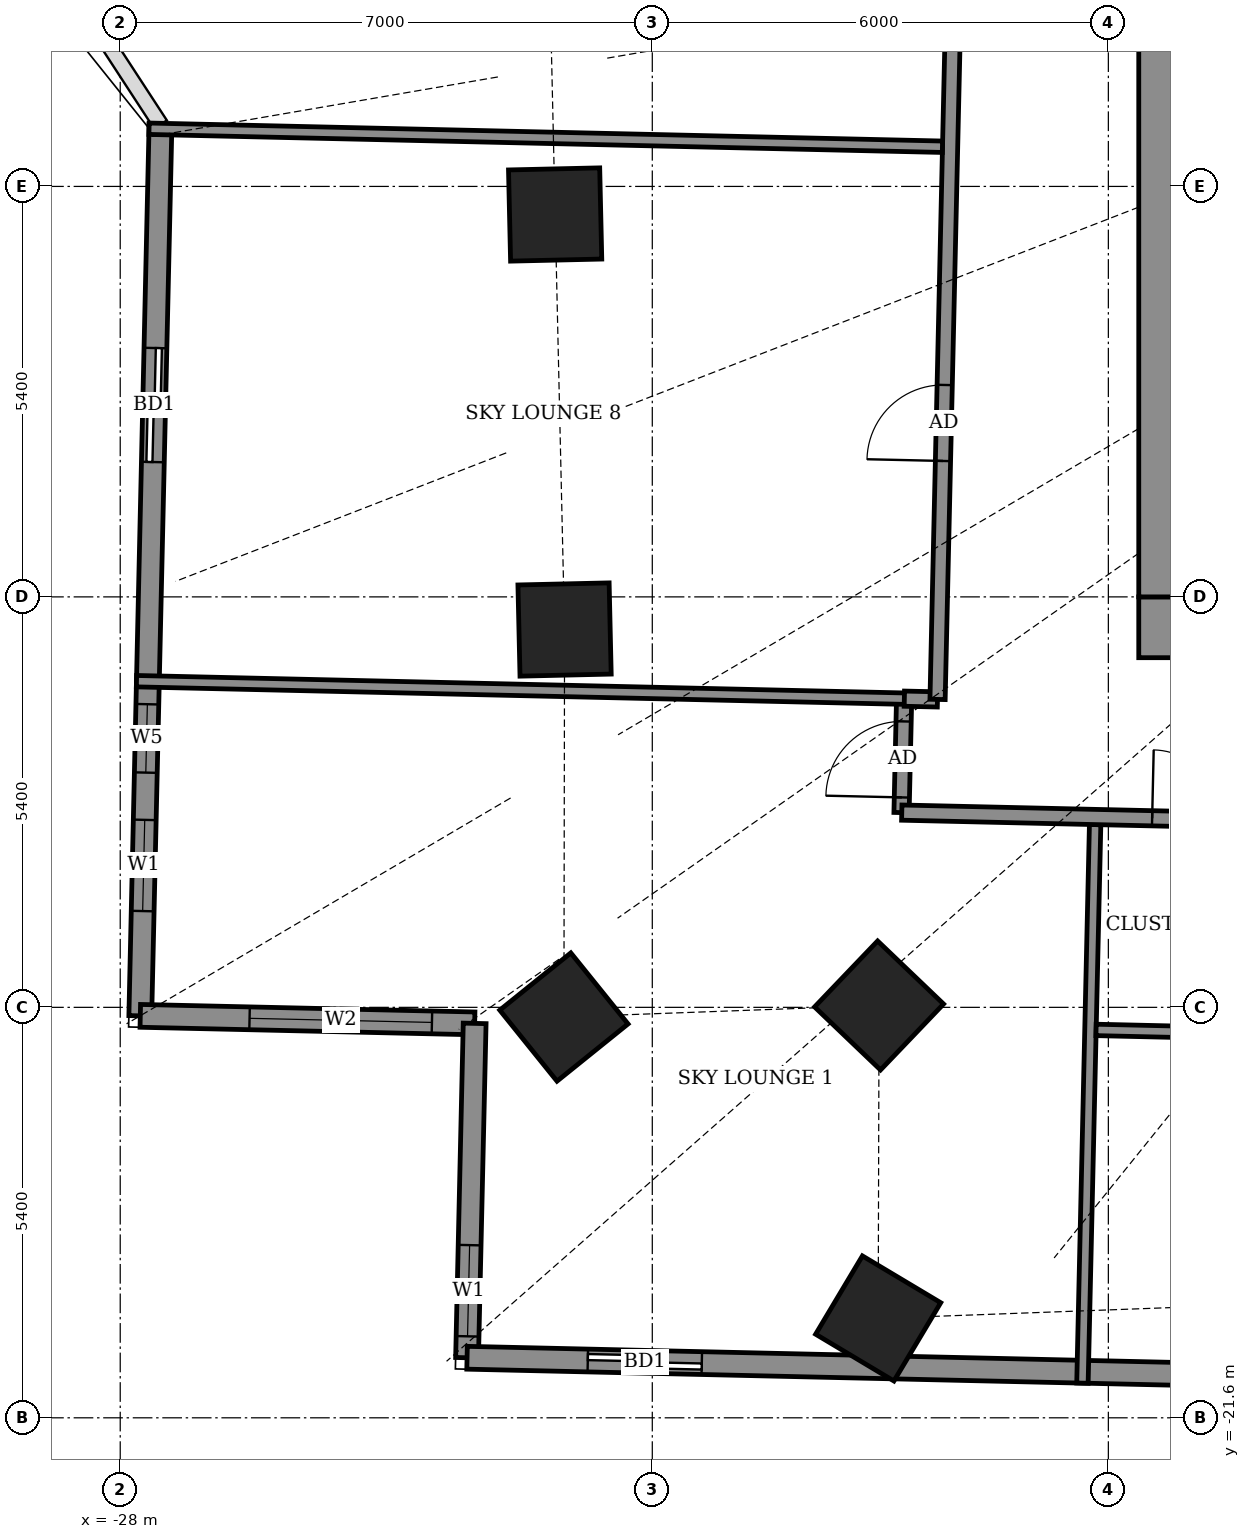
"""IFC4 building model, lengths in metres.
Left out: names, types, materials, properties, quantities, classifications, styles, units other than length and angle.
Written with IfcOpenShell. Run it as: python <this file> out.ifc"""

import sys

from ifc_helpers import new_model, si_unit, direction, frame, frame_2d, origin, origin_2d, place, context, subcontext, project, spatial, rectangle, extrude, element, fill, save


model = new_model("IFC4")
c1 = context("Model", 3, precision=1e-05, world=origin(), true_north=direction((0.0, 1.0)))
c2 = subcontext(c1, "Body", "Model", "MODEL_VIEW")
j1 = project(units=[si_unit("LENGTHUNIT", "METRE"), si_unit("PLANEANGLEUNIT", "RADIAN")], contexts=[c1])
p1 = place(None, origin())
s1 = spatial("IfcSite", under=j1, at=p1, CompositionType="ELEMENT")
p2 = place(p1, origin())
s2 = spatial("IfcBuilding", under=s1, at=p2, CompositionType="ELEMENT")
p3 = place(p2, frame((0.0, 0.0, 193.3)))
s3 = spatial("IfcBuildingStorey", under=s2, at=p3, CompositionType="ELEMENT", Elevation=193.3)
for number, where, z_axis, x_axis in (
    (1, (-22.278, -5.769, -0.55), (0.0, 0.0, 1.0), (0.023, -1.0, 0.0)),
    (2, (-22.154, -11.229, -0.55), (0.0, 0.0, 1.0), (0.023, -1.0, 0.0)),
    (3, (-22.163, -16.328, -0.55), (0.0, 0.0, 1.0), (0.627, -0.779, 0.0)),
    (4, (-18.016, -16.175, -0.55), (0.0, 0.0, 1.0), (0.723, -0.691, 0.0)),
    (5, (-18.028, -20.293, -0.55), (0.0, 0.0, 1.0), (0.858, -0.513, 0.0)),
):
    element("IfcColumn", number, at=place(p3, frame(where, z_axis=z_axis, x_axis=x_axis)), inside=s3, PredefinedType="COLUMN", context=c2, shape_type="SweptSolid", body=[
        extrude(rectangle(XDim=1.2, YDim=1.2, at=origin_2d()), origin(), (0.0, 0.0, 1.0), 4.6),
    ])
p4 = place(p3, frame((-27.47, -4.585, 0.0), z_axis=(0.0, 0.0, 1.0), x_axis=(-0.022686419344, -0.999742630069, 0.0)))
e6 = element("IfcWall", 6, at=p4, inside=s3, PredefinedType="SOLIDWALL", context=c2, shape_type="SweptSolid", body=[
    extrude(rectangle(XDim=11.73, YDim=0.3, at=frame_2d((5.865, 0.0))), origin(), (0.0, 0.0, 1.0), 2.85),
])
p5 = place(p4, frame((2.942, 0.0, 0.0)))
e7 = element("IfcOpeningElement", 7, at=p5, cuts=e6, PredefinedType="OPENING", context=c2, shape_type="SweptSolid", body=[
    extrude(rectangle(XDim=1.5, YDim=2.4, at=frame_2d((0.75, 1.2))), frame((0.0, 0.16, 0.0), z_axis=(0.0, -1.0, 0.0), x_axis=(1.0, 0.0, 0.0)), (0.0, 0.0, 1.0), 0.32),
])
p6 = place(p4, frame((7.629, 0.0, 0.9)))
e8 = element("IfcOpeningElement", 8, at=p6, cuts=e6, PredefinedType="OPENING", context=c2, shape_type="SweptSolid", body=[
    extrude(rectangle(XDim=0.9, YDim=1.5, at=frame_2d((0.45, 0.75))), frame((0.0, 0.16, 0.0), z_axis=(0.0, -1.0, 0.0), x_axis=(1.0, 0.0, 0.0)), (0.0, 0.0, 1.0), 0.32),
])
p7 = place(p4, frame((9.151, 0.0, 0.9)))
e9 = element("IfcOpeningElement", 9, at=p7, cuts=e6, PredefinedType="OPENING", context=c2, shape_type="SweptSolid", body=[
    extrude(rectangle(XDim=1.2, YDim=1.5, at=frame_2d((0.6, 0.75))), frame((0.0, 0.16, 0.0), z_axis=(0.0, -1.0, 0.0), x_axis=(1.0, 0.0, 0.0)), (0.0, 0.0, 1.0), 0.32),
])
p8 = place(p3, frame((-27.736, -16.312, 0.0), z_axis=(0.0, 0.0, 1.0), x_axis=(0.999747504193, -0.022470599878, 0.0)))
e10 = element("IfcWall", 10, at=p8, inside=s3, PredefinedType="SOLIDWALL", context=c2, shape_type="SweptSolid", body=[
    extrude(rectangle(XDim=4.4, YDim=0.3, at=frame_2d((2.2, 0.0))), origin(), (0.0, 0.0, 1.0), 2.85),
])
p9 = place(p8, frame((1.438, 0.0, 0.9)))
e11 = element("IfcOpeningElement", 11, at=p9, cuts=e10, PredefinedType="OPENING", context=c2, shape_type="SweptSolid", body=[
    extrude(rectangle(XDim=2.4, YDim=1.5, at=frame_2d((1.2, 0.75))), frame((0.0, 0.16, 0.0), z_axis=(0.0, -1.0, 0.0), x_axis=(1.0, 0.0, 0.0)), (0.0, 0.0, 1.0), 0.32),
])
p10 = place(p3, frame((-23.337, -16.411, 0.0), z_axis=(0.0, 0.0, 1.0), x_axis=(-0.022747872013, -0.999741233679, 0.0)))
e12 = element("IfcWall", 12, at=p10, inside=s3, PredefinedType="SOLIDWALL", context=c2, shape_type="SweptSolid", body=[
    extrude(rectangle(XDim=4.4, YDim=0.3, at=frame_2d((2.2, 0.0))), origin(), (0.0, 0.0, 1.0), 2.85),
])
p11 = place(p10, frame((2.918, 0.0, 0.9)))
e13 = element("IfcOpeningElement", 13, at=p11, cuts=e12, PredefinedType="OPENING", context=c2, shape_type="SweptSolid", body=[
    extrude(rectangle(XDim=1.2, YDim=1.5, at=frame_2d((0.6, 0.75))), frame((0.0, 0.16, 0.0), z_axis=(0.0, -1.0, 0.0), x_axis=(1.0, 0.0, 0.0)), (0.0, 0.0, 1.0), 0.32),
])
p12 = place(p3, frame((-23.437, -20.81, 0.0), z_axis=(0.0, 0.0, 1.0), x_axis=(0.999742269115, -0.022702320244, 0.0)))
e14 = element("IfcWall", 14, at=p12, inside=s3, PredefinedType="SOLIDWALL", context=c2, shape_type="SweptSolid", body=[
    extrude(rectangle(XDim=41.844, YDim=0.3, at=frame_2d((20.922, 0.0))), origin(), (0.0, 0.0, 1.0), 2.65),
])
p13 = place(p12, frame((1.589, 0.0, 0.0)))
e15 = element("IfcOpeningElement", 15, at=p13, cuts=e14, PredefinedType="OPENING", context=c2, shape_type="SweptSolid", body=[
    extrude(rectangle(XDim=1.5, YDim=2.4, at=frame_2d((0.75, 1.2))), frame((0.0, 0.16, 0.0), z_axis=(0.0, -1.0, 0.0), x_axis=(1.0, 0.0, 0.0)), (0.0, 0.0, 1.0), 0.32),
])
p14 = place(p12, frame((13.061, 0.0, 0.9)))
e16 = element("IfcOpeningElement", 16, at=p14, cuts=e14, PredefinedType="OPENING", context=c2, shape_type="SweptSolid", body=[
    extrude(rectangle(XDim=2.4, YDim=1.5, at=frame_2d((1.2, 0.75))), frame((0.0, 0.16, 0.0), z_axis=(0.0, -1.0, 0.0), x_axis=(1.0, 0.0, 0.0)), (0.0, 0.0, 1.0), 0.32),
])
p15 = place(p12, frame((19.323, 0.0, 0.0)))
e17 = element("IfcOpeningElement", 17, at=p15, cuts=e14, PredefinedType="OPENING", context=c2, shape_type="SweptSolid", body=[
    extrude(rectangle(XDim=1.5, YDim=2.4, at=frame_2d((0.75, 1.2))), frame((0.0, 0.16, 0.0), z_axis=(0.0, -1.0, 0.0), x_axis=(1.0, 0.0, 0.0)), (0.0, 0.0, 1.0), 0.32),
])
p16 = place(p12, frame((22.283, 0.0, 0.0)))
e18 = element("IfcOpeningElement", 18, at=p16, cuts=e14, PredefinedType="OPENING", context=c2, shape_type="SweptSolid", body=[
    extrude(rectangle(XDim=1.5, YDim=2.4, at=frame_2d((0.75, 1.2))), frame((0.0, 0.16, 0.0), z_axis=(0.0, -1.0, 0.0), x_axis=(1.0, 0.0, 0.0)), (0.0, 0.0, 1.0), 0.32),
])
p17 = place(p12, frame((28.825, 0.0, 0.9)))
e19 = element("IfcOpeningElement", 19, at=p17, cuts=e14, PredefinedType="OPENING", context=c2, shape_type="SweptSolid", body=[
    extrude(rectangle(XDim=2.4, YDim=1.5, at=frame_2d((1.2, 0.75))), frame((0.0, 0.16, 0.0), z_axis=(0.0, -1.0, 0.0), x_axis=(1.0, 0.0, 0.0)), (0.0, 0.0, 1.0), 0.32),
])
p18 = place(p12, frame((36.672, 0.0, 0.9)))
e20 = element("IfcOpeningElement", 20, at=p18, cuts=e14, PredefinedType="OPENING", context=c2, shape_type="SweptSolid", body=[
    extrude(rectangle(XDim=2.4, YDim=1.5, at=frame_2d((1.2, 0.75))), frame((0.0, 0.16, 0.0), z_axis=(0.0, -1.0, 0.0), x_axis=(1.0, 0.0, 0.0)), (0.0, 0.0, 1.0), 0.32),
])
p19 = place(p3, frame((-15.341, -21.144, 0.0), z_axis=(0.0, 0.0, 1.0), x_axis=(0.022719896304, 0.99974186984, 0.0)))
e21 = element("IfcWall", 21, at=p19, inside=s3, PredefinedType="PARTITIONING", context=c2, shape_type="SweptSolid", body=[
    extrude(rectangle(XDim=7.35, YDim=0.15, at=frame_2d((3.675, 0.0))), origin(), (0.0, 0.0, 1.0), 2.65),
])
p20 = place(p3, frame((-15.162, -16.497, 0.0), z_axis=(0.0, 0.0, 1.0), x_axis=(0.99974031529, -0.022788198363, 0.0)))
e22 = element("IfcWall", 22, at=p20, inside=s3, PredefinedType="PARTITIONING", context=c2, shape_type="SweptSolid", body=[
    extrude(rectangle(XDim=2.325, YDim=0.15, at=frame_2d((1.162, 0.0))), origin(), (0.0, 0.0, 1.0), 2.85),
])
p21 = place(p3, frame((-17.721, -13.638, 0.0), z_axis=(0.0, 0.0, 1.0), x_axis=(0.022632637625, 0.99974384905, 0.0)))
e23 = element("IfcWall", 23, at=p21, inside=s3, PredefinedType="PARTITIONING", context=c2, shape_type="SweptSolid", body=[
    extrude(rectangle(XDim=1.5, YDim=0.2, at=frame_2d((0.75, 0.0))), origin(), (0.0, 0.0, 1.0), 2.85),
])
p22 = place(p21, frame((0.2, 0.0, 0.0)))
e24 = element("IfcOpeningElement", 24, at=p22, cuts=e23, PredefinedType="OPENING", context=c2, shape_type="SweptSolid", body=[
    extrude(rectangle(XDim=1.0, YDim=2.1, at=frame_2d((0.5, 1.05))), frame((0.0, 0.11, 0.0), z_axis=(0.0, -1.0, 0.0), x_axis=(1.0, 0.0, 0.0)), (0.0, 0.0, 1.0), 0.22),
])
p23 = place(p3, frame((-17.718, -13.638, 0.0), z_axis=(0.0, 0.0, 1.0), x_axis=(0.999742614446, -0.022687107814, 0.0)))
e25 = element("IfcWall", 25, at=p23, inside=s3, PredefinedType="PARTITIONING", context=c2, shape_type="SweptSolid", body=[
    extrude(rectangle(XDim=37.514, YDim=0.2, at=frame_2d((18.757, 0.0))), origin(), (0.0, 0.0, 1.0), 2.85),
])
p24 = place(p23, frame((7.37, 0.0, 0.0)))
e26 = element("IfcOpeningElement", 26, at=p24, cuts=e25, PredefinedType="OPENING", context=c2, shape_type="SweptSolid", body=[
    extrude(rectangle(XDim=1.0, YDim=2.1, at=frame_2d((0.5, 1.05))), frame((0.0, 0.11, 0.0), z_axis=(0.0, -1.0, 0.0), x_axis=(1.0, 0.0, 0.0)), (0.0, 0.0, 1.0), 0.22),
])
p25 = place(p23, frame((3.295, 0.0, 0.0)))
e27 = element("IfcOpeningElement", 27, at=p25, cuts=e25, PredefinedType="OPENING", context=c2, shape_type="SweptSolid", body=[
    extrude(rectangle(XDim=0.9, YDim=2.1, at=frame_2d((0.45, 1.05))), frame((0.0, 0.11, 0.0), z_axis=(0.0, -1.0, 0.0), x_axis=(1.0, 0.0, 0.0)), (0.0, 0.0, 1.0), 0.22),
])
p26 = place(p23, frame((11.645, 0.0, 0.0)))
e28 = element("IfcOpeningElement", 28, at=p26, cuts=e25, PredefinedType="OPENING", context=c2, shape_type="SweptSolid", body=[
    extrude(rectangle(XDim=0.9, YDim=2.1, at=frame_2d((0.45, 1.05))), frame((0.0, 0.11, 0.0), z_axis=(0.0, -1.0, 0.0), x_axis=(1.0, 0.0, 0.0)), (0.0, 0.0, 1.0), 0.22),
])
p27 = place(p23, frame((19.02, 0.0, 0.0)))
e29 = element("IfcOpeningElement", 29, at=p27, cuts=e25, PredefinedType="OPENING", context=c2, shape_type="SweptSolid", body=[
    extrude(rectangle(XDim=0.9, YDim=2.1, at=frame_2d((0.45, 1.05))), frame((0.0, 0.11, 0.0), z_axis=(0.0, -1.0, 0.0), x_axis=(1.0, 0.0, 0.0)), (0.0, 0.0, 1.0), 0.22),
])
p28 = place(p23, frame((22.67, 0.0, 0.0)))
e30 = element("IfcOpeningElement", 30, at=p28, cuts=e25, PredefinedType="OPENING", context=c2, shape_type="SweptSolid", body=[
    extrude(rectangle(XDim=1.0, YDim=2.1, at=frame_2d((0.5, 1.05))), frame((0.0, 0.11, 0.0), z_axis=(0.0, -1.0, 0.0), x_axis=(1.0, 0.0, 0.0)), (0.0, 0.0, 1.0), 0.22),
])
p29 = place(p23, frame((26.445, 0.0, 0.0)))
e31 = element("IfcOpeningElement", 31, at=p29, cuts=e25, PredefinedType="OPENING", context=c2, shape_type="SweptSolid", body=[
    extrude(rectangle(XDim=0.9, YDim=2.1, at=frame_2d((0.45, 1.05))), frame((0.0, 0.11, 0.0), z_axis=(0.0, -1.0, 0.0), x_axis=(1.0, 0.0, 0.0)), (0.0, 0.0, 1.0), 0.22),
])
p30 = place(p23, frame((33.375, 0.0, 0.0)))
e32 = element("IfcOpeningElement", 32, at=p30, cuts=e25, PredefinedType="OPENING", context=c2, shape_type="SweptSolid", body=[
    extrude(rectangle(XDim=1.0, YDim=2.1, at=frame_2d((0.5, 1.05))), frame((0.0, 0.11, 0.0), z_axis=(0.0, -1.0, 0.0), x_axis=(1.0, 0.0, 0.0)), (0.0, 0.0, 1.0), 0.22),
])
p31 = place(p3, frame((-27.786, -11.909, 0.0), z_axis=(0.0, 0.0, 1.0), x_axis=(0.999741161797, -0.022751030932, 0.0)))
e33 = element("IfcWall", 33, at=p31, inside=s3, PredefinedType="PARTITIONING", context=c2, shape_type="SweptSolid", body=[
    extrude(rectangle(XDim=10.109, YDim=0.15, at=frame_2d((5.054, 0.0))), origin(), (0.0, 0.0, 1.0), 2.65),
])
p32 = place(p3, frame((-17.684, -12.139, 0.0), z_axis=(0.0, 0.0, 1.0), x_axis=(0.999736607625, -0.022950280466, 0.0)))
e34 = element("IfcWall", 34, at=p32, inside=s3, PredefinedType="PARTITIONING", context=c2, shape_type="SweptSolid", body=[
    extrude(rectangle(XDim=0.436, YDim=0.2, at=frame_2d((0.218, 0.0))), origin(), (0.0, 0.0, 1.0), 2.85),
])
p33 = place(p3, frame((-17.247, -12.149, 0.0), z_axis=(0.0, 0.0, 1.0), x_axis=(0.022698146637, 0.999742363881, 0.0)))
e35 = element("IfcWall", 35, at=p33, inside=s3, PredefinedType="PARTITIONING", context=c2, shape_type="SweptSolid", body=[
    extrude(rectangle(XDim=28.374, YDim=0.2, at=frame_2d((14.187, 0.0))), origin(), (0.0, 0.0, 1.0), 2.85),
])
p34 = place(p33, frame((22.9, 0.0, 0.0)))
e36 = element("IfcOpeningElement", 36, at=p34, cuts=e35, PredefinedType="OPENING", context=c2, shape_type="SweptSolid", body=[
    extrude(rectangle(XDim=1.0, YDim=2.1, at=frame_2d((0.5, 1.05))), frame((0.0, 0.11, 0.0), z_axis=(0.0, -1.0, 0.0), x_axis=(1.0, 0.0, 0.0)), (0.0, 0.0, 1.0), 0.22),
])
p35 = place(p33, frame((26.624, 0.0, 0.0)))
e37 = element("IfcOpeningElement", 37, at=p35, cuts=e35, PredefinedType="OPENING", context=c2, shape_type="SweptSolid", body=[
    extrude(rectangle(XDim=0.9, YDim=2.1, at=frame_2d((0.45, 1.05))), frame((0.0, 0.11, 0.0), z_axis=(0.0, -1.0, 0.0), x_axis=(1.0, 0.0, 0.0)), (0.0, 0.0, 1.0), 0.22),
])
p36 = place(p33, frame((16.5, 0.0, 0.0)))
e38 = element("IfcOpeningElement", 38, at=p36, cuts=e35, PredefinedType="OPENING", context=c2, shape_type="SweptSolid", body=[
    extrude(rectangle(XDim=1.0, YDim=2.1, at=frame_2d((0.5, 1.05))), frame((0.0, 0.11, 0.0), z_axis=(0.0, -1.0, 0.0), x_axis=(1.0, 0.0, 0.0)), (0.0, 0.0, 1.0), 0.22),
])
p37 = place(p33, frame((19.275, 0.0, 0.0)))
e39 = element("IfcOpeningElement", 39, at=p37, cuts=e35, PredefinedType="OPENING", context=c2, shape_type="SweptSolid", body=[
    extrude(rectangle(XDim=0.9, YDim=2.1, at=frame_2d((0.45, 1.05))), frame((0.0, 0.11, 0.0), z_axis=(0.0, -1.0, 0.0), x_axis=(1.0, 0.0, 0.0)), (0.0, 0.0, 1.0), 0.22),
])
p38 = place(p33, frame((14.0, 0.0, 0.0)))
e40 = element("IfcOpeningElement", 40, at=p38, cuts=e35, PredefinedType="OPENING", context=c2, shape_type="SweptSolid", body=[
    extrude(rectangle(XDim=1.0, YDim=2.1, at=frame_2d((0.5, 1.05))), frame((0.0, 0.11, 0.0), z_axis=(0.0, -1.0, 0.0), x_axis=(1.0, 0.0, 0.0)), (0.0, 0.0, 1.0), 0.22),
])
p39 = place(p33, frame((11.775, 0.0, 0.0)))
e41 = element("IfcOpeningElement", 41, at=p39, cuts=e35, PredefinedType="OPENING", context=c2, shape_type="SweptSolid", body=[
    extrude(rectangle(XDim=0.9, YDim=2.1, at=frame_2d((0.45, 1.05))), frame((0.0, 0.11, 0.0), z_axis=(0.0, -1.0, 0.0), x_axis=(1.0, 0.0, 0.0)), (0.0, 0.0, 1.0), 0.22),
])
p40 = place(p33, frame((8.712, 0.0, 0.0)))
e42 = element("IfcOpeningElement", 42, at=p40, cuts=e35, PredefinedType="OPENING", context=c2, shape_type="SweptSolid", body=[
    extrude(rectangle(XDim=1.0, YDim=2.1, at=frame_2d((0.5, 1.05))), frame((0.0, 0.11, 0.0), z_axis=(0.0, -1.0, 0.0), x_axis=(1.0, 0.0, 0.0)), (0.0, 0.0, 1.0), 0.22),
])
p41 = place(p33, frame((3.138, 0.0, 0.0)))
e43 = element("IfcOpeningElement", 43, at=p41, cuts=e35, PredefinedType="OPENING", context=c2, shape_type="SweptSolid", body=[
    extrude(rectangle(XDim=1.0, YDim=2.1, at=frame_2d((0.5, 1.05))), frame((0.0, 0.11, 0.0), z_axis=(0.0, -1.0, 0.0), x_axis=(1.0, 0.0, 0.0)), (0.0, 0.0, 1.0), 0.22),
])
p42 = place(p3, frame((-27.621, -4.641, 0.0), z_axis=(0.0, 0.0, 1.0), x_axis=(0.999742728106, -0.022682098664, 0.0)))
e44 = element("IfcWall", 44, at=p42, inside=s3, PredefinedType="PARTITIONING", context=c2, shape_type="SweptSolid", body=[
    extrude(rectangle(XDim=10.441, YDim=0.15, at=frame_2d((5.22, 0.0))), origin(), (0.0, 0.0, 1.0), 2.65),
])
p43 = place(p3, frame((-14.6, -11.2, 0.0), z_axis=(0.0, 0.0, 1.0), x_axis=(1.0, 0.0, 0.0)))
e45 = element("IfcWall", 45, at=p43, inside=s3, PredefinedType="SHEAR", context=c2, shape_type="SweptSolid", body=[
    extrude(rectangle(XDim=29.2, YDim=0.8, at=frame_2d((14.6, 0.0))), origin(), (0.0, 0.0, 1.0), 4.6),
])
p44 = place(p3, frame((-14.2, -10.8, 0.0), z_axis=(0.0, 0.0, 1.0), x_axis=(0.0, 1.0, 0.0)))
e46 = element("IfcWall", 46, at=p44, inside=s3, PredefinedType="SHEAR", context=c2, shape_type="SweptSolid", body=[
    extrude(rectangle(XDim=21.6, YDim=0.8, at=frame_2d((10.8, 0.0))), origin(), (0.0, 0.0, 1.0), 4.6),
])
p45 = place(p44, frame((8.25, 0.0, 0.0)))
e47 = element("IfcOpeningElement", 47, at=p45, cuts=e46, PredefinedType="OPENING", context=c2, shape_type="SweptSolid", body=[
    extrude(rectangle(XDim=1.2, YDim=2.1, at=frame_2d((0.6, 1.05))), frame((0.0, 0.41, 0.0), z_axis=(0.0, -1.0, 0.0), x_axis=(1.0, 0.0, 0.0)), (0.0, 0.0, 1.0), 0.82),
])
p46 = place(p44, frame((15.25, 0.0, 0.0)))
e48 = element("IfcOpeningElement", 48, at=p46, cuts=e46, PredefinedType="OPENING", context=c2, shape_type="SweptSolid", body=[
    extrude(rectangle(XDim=1.2, YDim=2.1, at=frame_2d((0.6, 1.05))), frame((0.0, 0.41, 0.0), z_axis=(0.0, -1.0, 0.0), x_axis=(1.0, 0.0, 0.0)), (0.0, 0.0, 1.0), 0.82),
])
p47 = place(p5, origin())
e49 = element("IfcDoor", 49, at=p47, inside=s3, OperationType="SLIDING_TO_LEFT", PredefinedType="DOOR", context=c2, shape_type="SweptSolid", body=[
    extrude(rectangle(XDim=1.5, YDim=2.4, at=frame_2d((0.75, 1.2))), frame((0.0, 0.025, 0.0), z_axis=(0.0, -1.0, 0.0), x_axis=(1.0, 0.0, 0.0)), (0.0, 0.0, 1.0), 0.05),
])
fill(e7, e49)
p48 = place(p6, origin())
e50 = element("IfcWindow", 50, at=p48, inside=s3, PartitioningType="SINGLE_PANEL", PredefinedType="WINDOW", context=c2, shape_type="SweptSolid", body=[
    extrude(rectangle(XDim=0.9, YDim=1.5, at=frame_2d((0.45, 0.75))), frame((0.0, 0.03, 0.0), z_axis=(0.0, -1.0, 0.0), x_axis=(1.0, 0.0, 0.0)), (0.0, 0.0, 1.0), 0.06),
])
fill(e8, e50)
p49 = place(p7, origin())
e51 = element("IfcWindow", 51, at=p49, inside=s3, PartitioningType="SINGLE_PANEL", PredefinedType="WINDOW", context=c2, shape_type="SweptSolid", body=[
    extrude(rectangle(XDim=1.2, YDim=1.5, at=frame_2d((0.6, 0.75))), frame((0.0, 0.03, 0.0), z_axis=(0.0, -1.0, 0.0), x_axis=(1.0, 0.0, 0.0)), (0.0, 0.0, 1.0), 0.06),
])
fill(e9, e51)
p50 = place(p9, origin())
e52 = element("IfcWindow", 52, at=p50, inside=s3, PartitioningType="DOUBLE_PANEL_VERTICAL", PredefinedType="WINDOW", context=c2, shape_type="SweptSolid", body=[
    extrude(rectangle(XDim=2.4, YDim=1.5, at=frame_2d((1.2, 0.75))), frame((0.0, 0.03, 0.0), z_axis=(0.0, -1.0, 0.0), x_axis=(1.0, 0.0, 0.0)), (0.0, 0.0, 1.0), 0.06),
])
fill(e11, e52)
p51 = place(p11, origin())
e53 = element("IfcWindow", 53, at=p51, inside=s3, PartitioningType="SINGLE_PANEL", PredefinedType="WINDOW", context=c2, shape_type="SweptSolid", body=[
    extrude(rectangle(XDim=1.2, YDim=1.5, at=frame_2d((0.6, 0.75))), frame((0.0, 0.03, 0.0), z_axis=(0.0, -1.0, 0.0), x_axis=(1.0, 0.0, 0.0)), (0.0, 0.0, 1.0), 0.06),
])
fill(e13, e53)
p52 = place(p13, origin())
e54 = element("IfcDoor", 54, at=p52, inside=s3, OperationType="SLIDING_TO_LEFT", PredefinedType="DOOR", context=c2, shape_type="SweptSolid", body=[
    extrude(rectangle(XDim=1.5, YDim=2.4, at=frame_2d((0.75, 1.2))), frame((0.0, 0.025, 0.0), z_axis=(0.0, -1.0, 0.0), x_axis=(1.0, 0.0, 0.0)), (0.0, 0.0, 1.0), 0.05),
])
fill(e15, e54)
p53 = place(p22, origin())
e55 = element("IfcDoor", 55, at=p53, inside=s3, OperationType="SINGLE_SWING_LEFT", PredefinedType="DOOR", context=c2, shape_type="SweptSolid", body=[
    extrude(rectangle(XDim=1.0, YDim=2.1, at=frame_2d((0.5, 1.05))), frame((0.0, 0.025, 0.0), z_axis=(0.0, -1.0, 0.0), x_axis=(1.0, 0.0, 0.0)), (0.0, 0.0, 1.0), 0.05),
])
fill(e24, e55)
p54 = place(p25, origin())
e56 = element("IfcDoor", 56, at=p54, inside=s3, OperationType="SINGLE_SWING_LEFT", PredefinedType="DOOR", context=c2, shape_type="SweptSolid", body=[
    extrude(rectangle(XDim=0.9, YDim=2.1, at=frame_2d((0.45, 1.05))), frame((0.0, 0.025, 0.0), z_axis=(0.0, -1.0, 0.0), x_axis=(1.0, 0.0, 0.0)), (0.0, 0.0, 1.0), 0.05),
])
fill(e27, e56)
p55 = place(p41, origin())
e57 = element("IfcDoor", 57, at=p55, inside=s3, OperationType="SINGLE_SWING_RIGHT", PredefinedType="DOOR", context=c2, shape_type="SweptSolid", body=[
    extrude(rectangle(XDim=1.0, YDim=2.1, at=frame_2d((0.5, 1.05))), frame((0.0, 0.025, 0.0), z_axis=(0.0, -1.0, 0.0), x_axis=(1.0, 0.0, 0.0)), (0.0, 0.0, 1.0), 0.05),
])
fill(e43, e57)
save(model, sys.argv[1])
